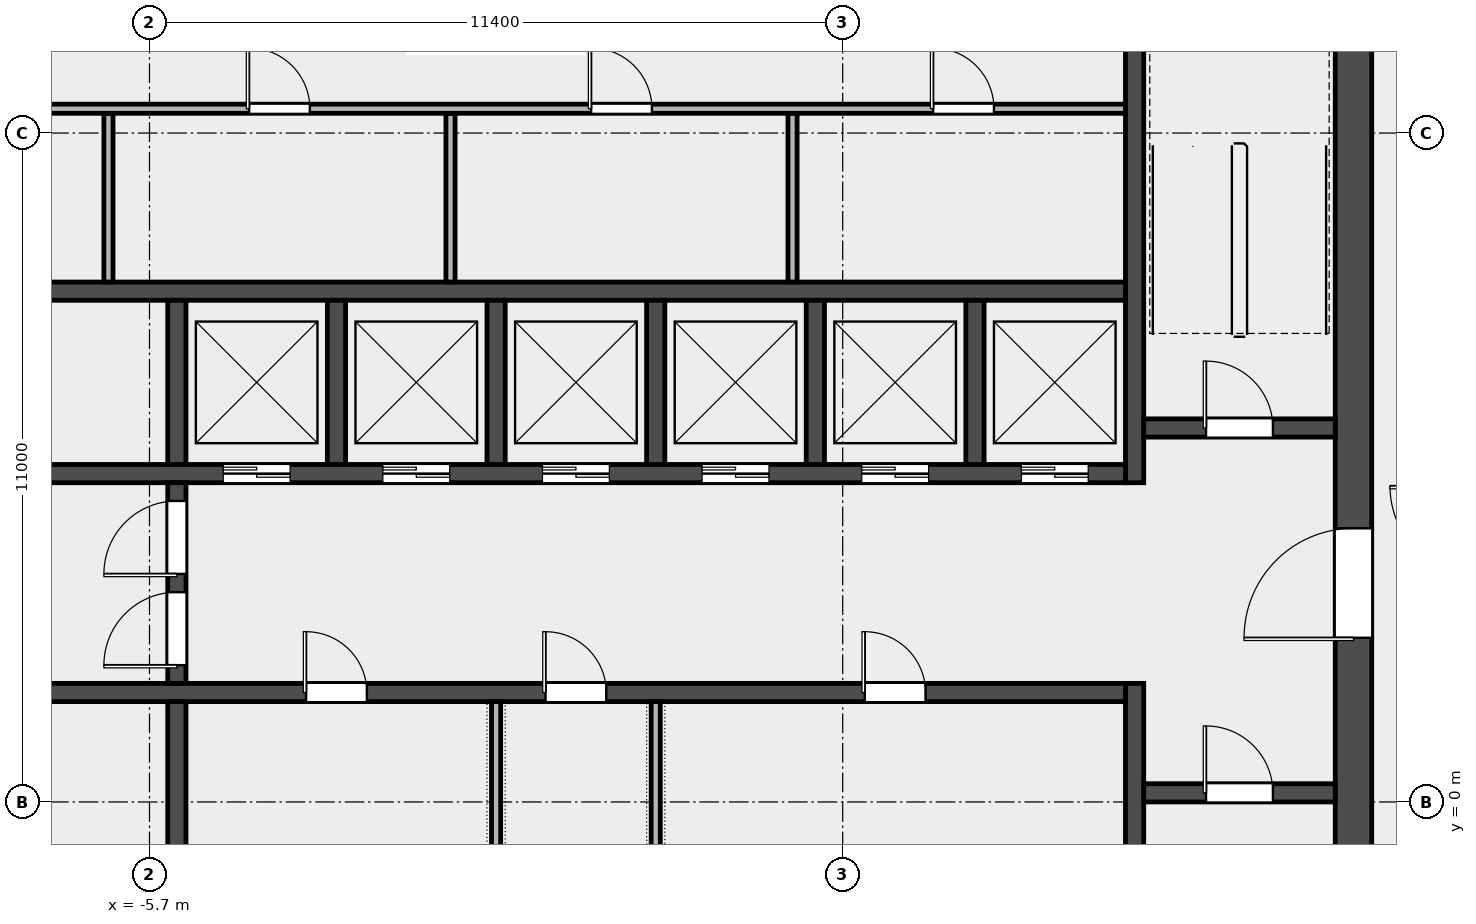
"""IFC4 building model, lengths in metres.
Left out: names, types, materials, properties, quantities, classifications, styles, units other than length and angle.
Written with IfcOpenShell. Run it as: python <this file> out.ifc"""

import sys

from ifc_helpers import new_model, si_unit, direction, frame, frame_2d, origin, place, context, subcontext, project, spatial, rectangle, extrude, element, fill, save


model = new_model("IFC4")
c1 = context("Model", 3, precision=1e-05, world=origin(), true_north=direction((0.0, 1.0)))
c2 = subcontext(c1, "Body", "Model", "MODEL_VIEW")
j1 = project(units=[si_unit("LENGTHUNIT", "METRE"), si_unit("PLANEANGLEUNIT", "RADIAN")], contexts=[c1])
p1 = place(None, origin())
s1 = spatial("IfcSite", under=j1, at=p1, CompositionType="ELEMENT")
p2 = place(p1, origin())
s2 = spatial("IfcBuilding", under=s1, at=p2, CompositionType="ELEMENT")
p3 = place(p2, frame((0.0, 0.0, 307.4)))
s3 = spatial("IfcBuildingStorey", under=s2, at=p3, CompositionType="ELEMENT", Elevation=307.4)
p4 = place(p3, frame((14.1, -6.6, 0.0), z_axis=(0.0, 0.0, 1.0), x_axis=(0.0, 1.0, 0.0)))
e1 = element("IfcWall", 1, at=p4, inside=s3, PredefinedType="SHEAR", context=c2, shape_type="SweptSolid", body=[
    extrude(rectangle(XDim=19.5, YDim=0.6, at=frame_2d((9.75, 0.0))), origin(), (0.0, 0.0, 1.0), 3.7),
])
p5 = place(p4, frame((9.3, 0.0, 0.0)))
e2 = element("IfcOpeningElement", 2, at=p5, cuts=e1, PredefinedType="OPENING", context=c2, shape_type="SweptSolid", body=[
    extrude(rectangle(XDim=1.8, YDim=2.1, at=frame_2d((0.9, 1.05))), frame((0.0, 0.312, 0.0), z_axis=(0.0, -1.0, 0.0), x_axis=(1.0, 0.0, 0.0)), (0.0, 0.0, 1.0), 0.624),
])
p6 = place(p3, frame((10.5, -6.6, 0.0), z_axis=(0.0, 0.0, 1.0), x_axis=(0.0, 1.0, 0.0)))
e3 = element("IfcWall", 3, at=p6, inside=s3, PredefinedType="SHEAR", context=c2, shape_type="SweptSolid", body=[
    extrude(rectangle(XDim=8.55, YDim=0.3, at=frame_2d((4.275, 0.0))), origin(), (0.0, 0.0, 1.0), 3.7),
])
p7 = place(p3, frame((10.5, 5.25, 0.0), z_axis=(0.0, 0.0, 1.0), x_axis=(0.0, 1.0, 0.0)))
e4 = element("IfcWall", 4, at=p7, inside=s3, PredefinedType="SHEAR", context=c2, shape_type="SweptSolid", body=[
    extrude(rectangle(XDim=7.65, YDim=0.3, at=frame_2d((3.825, 0.0))), origin(), (0.0, 0.0, 1.0), 3.7),
])
p8 = place(p3, frame((10.65, 0.15, 0.0), z_axis=(0.0, 0.0, 1.0), x_axis=(1.0, 0.0, 0.0)))
e5 = element("IfcWall", 5, at=p8, inside=s3, PredefinedType="SOLIDWALL", context=c2, shape_type="SweptSolid", body=[
    extrude(rectangle(XDim=3.15, YDim=0.3, at=frame_2d((1.575, 0.0))), origin(), (0.0, 0.0, 1.0), 3.7),
])
p9 = place(p8, frame((1.025, 0.0, 0.0)))
e6 = element("IfcOpeningElement", 6, at=p9, cuts=e5, PredefinedType="OPENING", context=c2, shape_type="SweptSolid", body=[
    extrude(rectangle(XDim=1.1, YDim=2.1, at=frame_2d((0.55, 1.05))), frame((0.0, 0.162, 0.0), z_axis=(0.0, -1.0, 0.0), x_axis=(1.0, 0.0, 0.0)), (0.0, 0.0, 1.0), 0.324),
])
p10 = place(p3, frame((10.65, 6.15, 0.0), z_axis=(0.0, 0.0, 1.0), x_axis=(1.0, 0.0, 0.0)))
e7 = element("IfcWall", 7, at=p10, inside=s3, PredefinedType="SOLIDWALL", context=c2, shape_type="SweptSolid", body=[
    extrude(rectangle(XDim=3.15, YDim=0.3, at=frame_2d((1.575, 0.0))), origin(), (0.0, 0.0, 1.0), 3.7),
])
p11 = place(p10, frame((1.025, 0.0, 0.0)))
e8 = element("IfcOpeningElement", 8, at=p11, cuts=e7, PredefinedType="OPENING", context=c2, shape_type="SweptSolid", body=[
    extrude(rectangle(XDim=1.1, YDim=2.1, at=frame_2d((0.55, 1.05))), frame((0.0, 0.162, 0.0), z_axis=(0.0, -1.0, 0.0), x_axis=(1.0, 0.0, 0.0)), (0.0, 0.0, 1.0), 0.324),
])
p12 = place(p3, frame((-10.35, 1.8, 0.0), z_axis=(0.0, 0.0, 1.0), x_axis=(1.0, 0.0, 0.0)))
e9 = element("IfcWall", 9, at=p12, inside=s3, PredefinedType="SOLIDWALL", context=c2, shape_type="SweptSolid", body=[
    extrude(rectangle(XDim=20.7, YDim=0.3, at=frame_2d((10.35, 0.0))), origin(), (0.0, 0.0, 1.0), 3.7),
])
p13 = place(p12, frame((0.512, 0.0, 0.0)))
e10 = element("IfcOpeningElement", 10, at=p13, cuts=e9, PredefinedType="OPENING", context=c2, shape_type="SweptSolid", body=[
    extrude(rectangle(XDim=1.3, YDim=2.1, at=frame_2d((0.65, 1.05))), frame((0.0, 0.162, 0.0), z_axis=(0.0, -1.0, 0.0), x_axis=(1.0, 0.0, 0.0)), (0.0, 0.0, 1.0), 0.324),
])
p14 = place(p12, frame((7.225, 0.0, 0.0)))
e11 = element("IfcOpeningElement", 11, at=p14, cuts=e9, PredefinedType="OPENING", context=c2, shape_type="SweptSolid", body=[
    extrude(rectangle(XDim=1.0, YDim=2.1, at=frame_2d((0.5, 1.05))), frame((0.0, 0.162, 0.0), z_axis=(0.0, -1.0, 0.0), x_axis=(1.0, 0.0, 0.0)), (0.0, 0.0, 1.0), 0.324),
])
p15 = place(p12, frame((11.163, 0.0, 0.0)))
e12 = element("IfcOpeningElement", 12, at=p15, cuts=e9, PredefinedType="OPENING", context=c2, shape_type="SweptSolid", body=[
    extrude(rectangle(XDim=1.0, YDim=2.1, at=frame_2d((0.5, 1.05))), frame((0.0, 0.162, 0.0), z_axis=(0.0, -1.0, 0.0), x_axis=(1.0, 0.0, 0.0)), (0.0, 0.0, 1.0), 0.324),
])
p16 = place(p12, frame((16.413, 0.0, 0.0)))
e13 = element("IfcOpeningElement", 13, at=p16, cuts=e9, PredefinedType="OPENING", context=c2, shape_type="SweptSolid", body=[
    extrude(rectangle(XDim=1.0, YDim=2.1, at=frame_2d((0.5, 1.05))), frame((0.0, 0.162, 0.0), z_axis=(0.0, -1.0, 0.0), x_axis=(1.0, 0.0, 0.0)), (0.0, 0.0, 1.0), 0.324),
])
p17 = place(p3, frame((-10.35, 5.4, 0.0), z_axis=(0.0, 0.0, 1.0), x_axis=(1.0, 0.0, 0.0)))
e14 = element("IfcWall", 14, at=p17, inside=s3, PredefinedType="SOLIDWALL", context=c2, shape_type="SweptSolid", body=[
    extrude(rectangle(XDim=20.7, YDim=0.3, at=frame_2d((10.35, 0.0))), origin(), (0.0, 0.0, 1.0), 3.7),
])
p18 = place(p17, frame((0.512, 0.0, 0.0)))
e15 = element("IfcOpeningElement", 15, at=p18, cuts=e14, PredefinedType="OPENING", context=c2, shape_type="SweptSolid", body=[
    extrude(rectangle(XDim=1.3, YDim=2.1, at=frame_2d((0.65, 1.05))), frame((0.0, 0.162, 0.0), z_axis=(0.0, -1.0, 0.0), x_axis=(1.0, 0.0, 0.0)), (0.0, 0.0, 1.0), 0.324),
])
p19 = place(p17, frame((5.863, 0.0, 0.0)))
e16 = element("IfcOpeningElement", 16, at=p19, cuts=e14, PredefinedType="OPENING", context=c2, shape_type="SweptSolid", body=[
    extrude(rectangle(XDim=1.1, YDim=2.1, at=frame_2d((0.55, 1.05))), frame((0.0, 0.162, 0.0), z_axis=(0.0, -1.0, 0.0), x_axis=(1.0, 0.0, 0.0)), (0.0, 0.0, 1.0), 0.324),
])
p20 = place(p17, frame((8.488, 0.0, 0.0)))
e17 = element("IfcOpeningElement", 17, at=p20, cuts=e14, PredefinedType="OPENING", context=c2, shape_type="SweptSolid", body=[
    extrude(rectangle(XDim=1.1, YDim=2.1, at=frame_2d((0.55, 1.05))), frame((0.0, 0.162, 0.0), z_axis=(0.0, -1.0, 0.0), x_axis=(1.0, 0.0, 0.0)), (0.0, 0.0, 1.0), 0.324),
])
p21 = place(p17, frame((11.113, 0.0, 0.0)))
e18 = element("IfcOpeningElement", 18, at=p21, cuts=e14, PredefinedType="OPENING", context=c2, shape_type="SweptSolid", body=[
    extrude(rectangle(XDim=1.1, YDim=2.1, at=frame_2d((0.55, 1.05))), frame((0.0, 0.162, 0.0), z_axis=(0.0, -1.0, 0.0), x_axis=(1.0, 0.0, 0.0)), (0.0, 0.0, 1.0), 0.324),
])
p22 = place(p17, frame((13.738, 0.0, 0.0)))
e19 = element("IfcOpeningElement", 19, at=p22, cuts=e14, PredefinedType="OPENING", context=c2, shape_type="SweptSolid", body=[
    extrude(rectangle(XDim=1.1, YDim=2.1, at=frame_2d((0.55, 1.05))), frame((0.0, 0.162, 0.0), z_axis=(0.0, -1.0, 0.0), x_axis=(1.0, 0.0, 0.0)), (0.0, 0.0, 1.0), 0.324),
])
p23 = place(p17, frame((16.363, 0.0, 0.0)))
e20 = element("IfcOpeningElement", 20, at=p23, cuts=e14, PredefinedType="OPENING", context=c2, shape_type="SweptSolid", body=[
    extrude(rectangle(XDim=1.1, YDim=2.1, at=frame_2d((0.55, 1.05))), frame((0.0, 0.162, 0.0), z_axis=(0.0, -1.0, 0.0), x_axis=(1.0, 0.0, 0.0)), (0.0, 0.0, 1.0), 0.324),
])
p24 = place(p17, frame((18.988, 0.0, 0.0)))
e21 = element("IfcOpeningElement", 21, at=p24, cuts=e14, PredefinedType="OPENING", context=c2, shape_type="SweptSolid", body=[
    extrude(rectangle(XDim=1.1, YDim=2.1, at=frame_2d((0.55, 1.05))), frame((0.0, 0.162, 0.0), z_axis=(0.0, -1.0, 0.0), x_axis=(1.0, 0.0, 0.0)), (0.0, 0.0, 1.0), 0.324),
])
p25 = place(p3, frame((-10.35, 8.4, 0.0), z_axis=(0.0, 0.0, 1.0), x_axis=(1.0, 0.0, 0.0)))
e22 = element("IfcWall", 22, at=p25, inside=s3, PredefinedType="SOLIDWALL", context=c2, shape_type="SweptSolid", body=[
    extrude(rectangle(XDim=20.7, YDim=0.3, at=frame_2d((10.35, 0.0))), origin(), (0.0, 0.0, 1.0), 3.7),
])
for number, where, z_axis, x_axis in (
    (23, (-5.25, -1.05, 0.0), (0.0, 0.0, 1.0), (0.0, 1.0, 0.0)),
    (24, (-5.25, 5.55, 0.0), (0.0, 0.0, 1.0), (0.0, 1.0, 0.0)),
    (25, (-2.625, 5.55, 0.0), (0.0, 0.0, 1.0), (0.0, 1.0, 0.0)),
    (26, (0.0, 5.55, 0.0), (0.0, 0.0, 1.0), (0.0, 1.0, 0.0)),
    (27, (2.625, 5.55, 0.0), (0.0, 0.0, 1.0), (0.0, 1.0, 0.0)),
    (28, (5.25, 5.55, 0.0), (0.0, 0.0, 1.0), (0.0, 1.0, 0.0)),
    (29, (7.875, 5.55, 0.0), (0.0, 0.0, 1.0), (0.0, 1.0, 0.0)),
):
    element("IfcWall", number, at=place(p3, frame(where, z_axis=z_axis, x_axis=x_axis)), inside=s3, PredefinedType="SOLIDWALL", context=c2, shape_type="SweptSolid", body=[
        extrude(rectangle(XDim=2.7, YDim=0.3, at=frame_2d((1.35, 0.0))), origin(), (0.0, 0.0, 1.0), 3.7),
    ])
p26 = place(p3, frame((-5.25, 1.95, 0.0), z_axis=(0.0, 0.0, 1.0), x_axis=(0.0, 1.0, 0.0)))
e30 = element("IfcWall", 30, at=p26, inside=s3, PredefinedType="SOLIDWALL", context=c2, shape_type="SweptSolid", body=[
    extrude(rectangle(XDim=3.3, YDim=0.3, at=frame_2d((1.65, 0.0))), origin(), (0.0, 0.0, 1.0), 3.7),
])
p27 = place(p26, frame((0.3, 0.0, 0.0)))
e31 = element("IfcOpeningElement", 31, at=p27, cuts=e30, PredefinedType="OPENING", context=c2, shape_type="SweptSolid", body=[
    extrude(rectangle(XDim=1.2, YDim=2.1, at=frame_2d((0.6, 1.05))), frame((0.0, 0.162, 0.0), z_axis=(0.0, -1.0, 0.0), x_axis=(1.0, 0.0, 0.0)), (0.0, 0.0, 1.0), 0.324),
])
p28 = place(p26, frame((1.8, 0.0, 0.0)))
e32 = element("IfcOpeningElement", 32, at=p28, cuts=e30, PredefinedType="OPENING", context=c2, shape_type="SweptSolid", body=[
    extrude(rectangle(XDim=1.2, YDim=2.1, at=frame_2d((0.6, 1.05))), frame((0.0, 0.162, 0.0), z_axis=(0.0, -1.0, 0.0), x_axis=(1.0, 0.0, 0.0)), (0.0, 0.0, 1.0), 0.324),
])
for number, where, z_axis, x_axis in (
    (33, (-6.375, 8.55, 0.0), (0.0, 0.0, 1.0), (0.0, 1.0, 0.0)),
    (34, (-0.75, 8.55, 0.0), (0.0, 0.0, 1.0), (0.0, 1.0, 0.0)),
    (35, (4.875, 8.55, 0.0), (0.0, 0.0, 1.0), (0.0, 1.0, 0.0)),
):
    element("IfcWall", number, at=place(p3, frame(where, z_axis=z_axis, x_axis=x_axis)), inside=s3, PredefinedType="PARTITIONING", context=c2, shape_type="SweptSolid", body=[
        extrude(rectangle(XDim=2.775, YDim=0.15, at=frame_2d((1.387, 0.0))), origin(), (0.0, 0.0, 1.0), 3.7),
    ])
p29 = place(p3, frame((-10.35, 11.4, 0.0), z_axis=(0.0, 0.0, 1.0), x_axis=(1.0, 0.0, 0.0)))
e36 = element("IfcWall", 36, at=p29, inside=s3, PredefinedType="PARTITIONING", context=c2, shape_type="SweptSolid", body=[
    extrude(rectangle(XDim=20.7, YDim=0.15, at=frame_2d((10.35, 0.0))), origin(), (0.0, 0.0, 1.0), 3.7),
])
p30 = place(p29, frame((1.413, 0.0, 0.0)))
e37 = element("IfcOpeningElement", 37, at=p30, cuts=e36, PredefinedType="OPENING", context=c2, shape_type="SweptSolid", body=[
    extrude(rectangle(XDim=1.0, YDim=2.1, at=frame_2d((0.5, 1.05))), frame((0.0, 0.087, 0.0), z_axis=(0.0, -1.0, 0.0), x_axis=(1.0, 0.0, 0.0)), (0.0, 0.0, 1.0), 0.174),
])
p31 = place(p29, frame((6.288, 0.0, 0.0)))
e38 = element("IfcOpeningElement", 38, at=p31, cuts=e36, PredefinedType="OPENING", context=c2, shape_type="SweptSolid", body=[
    extrude(rectangle(XDim=1.0, YDim=2.1, at=frame_2d((0.5, 1.05))), frame((0.0, 0.087, 0.0), z_axis=(0.0, -1.0, 0.0), x_axis=(1.0, 0.0, 0.0)), (0.0, 0.0, 1.0), 0.174),
])
p32 = place(p29, frame((11.913, 0.0, 0.0)))
e39 = element("IfcOpeningElement", 39, at=p32, cuts=e36, PredefinedType="OPENING", context=c2, shape_type="SweptSolid", body=[
    extrude(rectangle(XDim=1.0, YDim=2.1, at=frame_2d((0.5, 1.05))), frame((0.0, 0.087, 0.0), z_axis=(0.0, -1.0, 0.0), x_axis=(1.0, 0.0, 0.0)), (0.0, 0.0, 1.0), 0.174),
])
p33 = place(p29, frame((17.538, 0.0, 0.0)))
e40 = element("IfcOpeningElement", 40, at=p33, cuts=e36, PredefinedType="OPENING", context=c2, shape_type="SweptSolid", body=[
    extrude(rectangle(XDim=1.0, YDim=2.1, at=frame_2d((0.5, 1.05))), frame((0.0, 0.087, 0.0), z_axis=(0.0, -1.0, 0.0), x_axis=(1.0, 0.0, 0.0)), (0.0, 0.0, 1.0), 0.174),
])
for number, where, z_axis, x_axis in (
    (41, (0.0, -1.05, 0.0), (0.0, 0.0, 1.0), (0.0, 1.0, 0.0)),
    (42, (2.625, -1.05, 0.0), (0.0, 0.0, 1.0), (0.0, 1.0, 0.0)),
):
    element("IfcWall", number, at=place(p3, frame(where, z_axis=z_axis, x_axis=x_axis)), inside=s3, PredefinedType="PARTITIONING", context=c2, shape_type="SweptSolid", body=[
        extrude(rectangle(XDim=2.7, YDim=0.15, at=frame_2d((1.35, 0.0))), origin(), (0.0, 0.0, 1.0), 3.7),
    ])
p34 = place(p9, origin())
e43 = element("IfcDoor", 43, at=p34, inside=s3, OperationType="SINGLE_SWING_RIGHT", PredefinedType="DOOR", context=c2, shape_type="SweptSolid", body=[
    extrude(rectangle(XDim=1.1, YDim=2.1, at=frame_2d((0.55, 1.05))), frame((0.0, 0.025, 0.0), z_axis=(0.0, -1.0, 0.0), x_axis=(1.0, 0.0, 0.0)), (0.0, 0.0, 1.0), 0.05),
])
fill(e6, e43)
p35 = place(p11, origin())
e44 = element("IfcDoor", 44, at=p35, inside=s3, OperationType="SINGLE_SWING_RIGHT", PredefinedType="DOOR", context=c2, shape_type="SweptSolid", body=[
    extrude(rectangle(XDim=1.1, YDim=2.1, at=frame_2d((0.55, 1.05))), frame((0.0, 0.025, 0.0), z_axis=(0.0, -1.0, 0.0), x_axis=(1.0, 0.0, 0.0)), (0.0, 0.0, 1.0), 0.05),
])
fill(e8, e44)
p36 = place(p5, origin())
e45 = element("IfcDoor", 45, at=p36, inside=s3, OperationType="DOUBLE_DOOR_SINGLE_SWING", PredefinedType="DOOR", context=c2, shape_type="SweptSolid", body=[
    extrude(rectangle(XDim=1.8, YDim=2.1, at=frame_2d((0.9, 1.05))), frame((0.0, 0.025, 0.0), z_axis=(0.0, -1.0, 0.0), x_axis=(1.0, 0.0, 0.0)), (0.0, 0.0, 1.0), 0.05),
])
fill(e2, e45)
p37 = place(p27, origin())
e46 = element("IfcDoor", 46, at=p37, inside=s3, OperationType="SINGLE_SWING_LEFT", PredefinedType="DOOR", context=c2, shape_type="SweptSolid", body=[
    extrude(rectangle(XDim=1.2, YDim=2.1, at=frame_2d((0.6, 1.05))), frame((0.0, 0.025, 0.0), z_axis=(0.0, -1.0, 0.0), x_axis=(1.0, 0.0, 0.0)), (0.0, 0.0, 1.0), 0.05),
])
fill(e31, e46)
p38 = place(p28, origin())
e47 = element("IfcDoor", 47, at=p38, inside=s3, OperationType="SINGLE_SWING_RIGHT", PredefinedType="DOOR", context=c2, shape_type="SweptSolid", body=[
    extrude(rectangle(XDim=1.2, YDim=2.1, at=frame_2d((0.6, 1.05))), frame((0.0, 0.025, 0.0), z_axis=(0.0, -1.0, 0.0), x_axis=(1.0, 0.0, 0.0)), (0.0, 0.0, 1.0), 0.05),
])
fill(e32, e47)
p39 = place(p19, origin())
e48 = element("IfcDoor", 48, at=p39, inside=s3, OperationType="DOUBLE_DOOR_SLIDING", PredefinedType="DOOR", context=c2, shape_type="SweptSolid", body=[
    extrude(rectangle(XDim=1.1, YDim=2.1, at=frame_2d((0.55, 1.05))), frame((0.0, 0.025, 0.0), z_axis=(0.0, -1.0, 0.0), x_axis=(1.0, 0.0, 0.0)), (0.0, 0.0, 1.0), 0.05),
])
fill(e16, e48)
p40 = place(p20, origin())
e49 = element("IfcDoor", 49, at=p40, inside=s3, OperationType="DOUBLE_DOOR_SLIDING", PredefinedType="DOOR", context=c2, shape_type="SweptSolid", body=[
    extrude(rectangle(XDim=1.1, YDim=2.1, at=frame_2d((0.55, 1.05))), frame((0.0, 0.025, 0.0), z_axis=(0.0, -1.0, 0.0), x_axis=(1.0, 0.0, 0.0)), (0.0, 0.0, 1.0), 0.05),
])
fill(e17, e49)
p41 = place(p21, origin())
e50 = element("IfcDoor", 50, at=p41, inside=s3, OperationType="DOUBLE_DOOR_SLIDING", PredefinedType="DOOR", context=c2, shape_type="SweptSolid", body=[
    extrude(rectangle(XDim=1.1, YDim=2.1, at=frame_2d((0.55, 1.05))), frame((0.0, 0.025, 0.0), z_axis=(0.0, -1.0, 0.0), x_axis=(1.0, 0.0, 0.0)), (0.0, 0.0, 1.0), 0.05),
])
fill(e18, e50)
p42 = place(p22, origin())
e51 = element("IfcDoor", 51, at=p42, inside=s3, OperationType="DOUBLE_DOOR_SLIDING", PredefinedType="DOOR", context=c2, shape_type="SweptSolid", body=[
    extrude(rectangle(XDim=1.1, YDim=2.1, at=frame_2d((0.55, 1.05))), frame((0.0, 0.025, 0.0), z_axis=(0.0, -1.0, 0.0), x_axis=(1.0, 0.0, 0.0)), (0.0, 0.0, 1.0), 0.05),
])
fill(e19, e51)
p43 = place(p23, origin())
e52 = element("IfcDoor", 52, at=p43, inside=s3, OperationType="DOUBLE_DOOR_SLIDING", PredefinedType="DOOR", context=c2, shape_type="SweptSolid", body=[
    extrude(rectangle(XDim=1.1, YDim=2.1, at=frame_2d((0.55, 1.05))), frame((0.0, 0.025, 0.0), z_axis=(0.0, -1.0, 0.0), x_axis=(1.0, 0.0, 0.0)), (0.0, 0.0, 1.0), 0.05),
])
fill(e20, e52)
p44 = place(p24, origin())
e53 = element("IfcDoor", 53, at=p44, inside=s3, OperationType="DOUBLE_DOOR_SLIDING", PredefinedType="DOOR", context=c2, shape_type="SweptSolid", body=[
    extrude(rectangle(XDim=1.1, YDim=2.1, at=frame_2d((0.55, 1.05))), frame((0.0, 0.025, 0.0), z_axis=(0.0, -1.0, 0.0), x_axis=(1.0, 0.0, 0.0)), (0.0, 0.0, 1.0), 0.05),
])
fill(e21, e53)
p45 = place(p31, origin())
e54 = element("IfcDoor", 54, at=p45, inside=s3, OperationType="SINGLE_SWING_LEFT", PredefinedType="DOOR", context=c2, shape_type="SweptSolid", body=[
    extrude(rectangle(XDim=1.0, YDim=2.1, at=frame_2d((0.5, 1.05))), frame((0.0, 0.025, 0.0), z_axis=(0.0, -1.0, 0.0), x_axis=(1.0, 0.0, 0.0)), (0.0, 0.0, 1.0), 0.05),
])
fill(e38, e54)
p46 = place(p32, origin())
e55 = element("IfcDoor", 55, at=p46, inside=s3, OperationType="SINGLE_SWING_LEFT", PredefinedType="DOOR", context=c2, shape_type="SweptSolid", body=[
    extrude(rectangle(XDim=1.0, YDim=2.1, at=frame_2d((0.5, 1.05))), frame((0.0, 0.025, 0.0), z_axis=(0.0, -1.0, 0.0), x_axis=(1.0, 0.0, 0.0)), (0.0, 0.0, 1.0), 0.05),
])
fill(e39, e55)
p47 = place(p33, origin())
e56 = element("IfcDoor", 56, at=p47, inside=s3, OperationType="SINGLE_SWING_LEFT", PredefinedType="DOOR", context=c2, shape_type="SweptSolid", body=[
    extrude(rectangle(XDim=1.0, YDim=2.1, at=frame_2d((0.5, 1.05))), frame((0.0, 0.025, 0.0), z_axis=(0.0, -1.0, 0.0), x_axis=(1.0, 0.0, 0.0)), (0.0, 0.0, 1.0), 0.05),
])
fill(e40, e56)
p48 = place(p14, origin())
e57 = element("IfcDoor", 57, at=p48, inside=s3, OperationType="SINGLE_SWING_LEFT", PredefinedType="DOOR", context=c2, shape_type="SweptSolid", body=[
    extrude(rectangle(XDim=1.0, YDim=2.1, at=frame_2d((0.5, 1.05))), frame((0.0, 0.025, 0.0), z_axis=(0.0, -1.0, 0.0), x_axis=(1.0, 0.0, 0.0)), (0.0, 0.0, 1.0), 0.05),
])
fill(e11, e57)
p49 = place(p15, origin())
e58 = element("IfcDoor", 58, at=p49, inside=s3, OperationType="SINGLE_SWING_LEFT", PredefinedType="DOOR", context=c2, shape_type="SweptSolid", body=[
    extrude(rectangle(XDim=1.0, YDim=2.1, at=frame_2d((0.5, 1.05))), frame((0.0, 0.025, 0.0), z_axis=(0.0, -1.0, 0.0), x_axis=(1.0, 0.0, 0.0)), (0.0, 0.0, 1.0), 0.05),
])
fill(e12, e58)
p50 = place(p16, origin())
e59 = element("IfcDoor", 59, at=p50, inside=s3, OperationType="SINGLE_SWING_LEFT", PredefinedType="DOOR", context=c2, shape_type="SweptSolid", body=[
    extrude(rectangle(XDim=1.0, YDim=2.1, at=frame_2d((0.5, 1.05))), frame((0.0, 0.025, 0.0), z_axis=(0.0, -1.0, 0.0), x_axis=(1.0, 0.0, 0.0)), (0.0, 0.0, 1.0), 0.05),
])
fill(e13, e59)
save(model, sys.argv[1])
